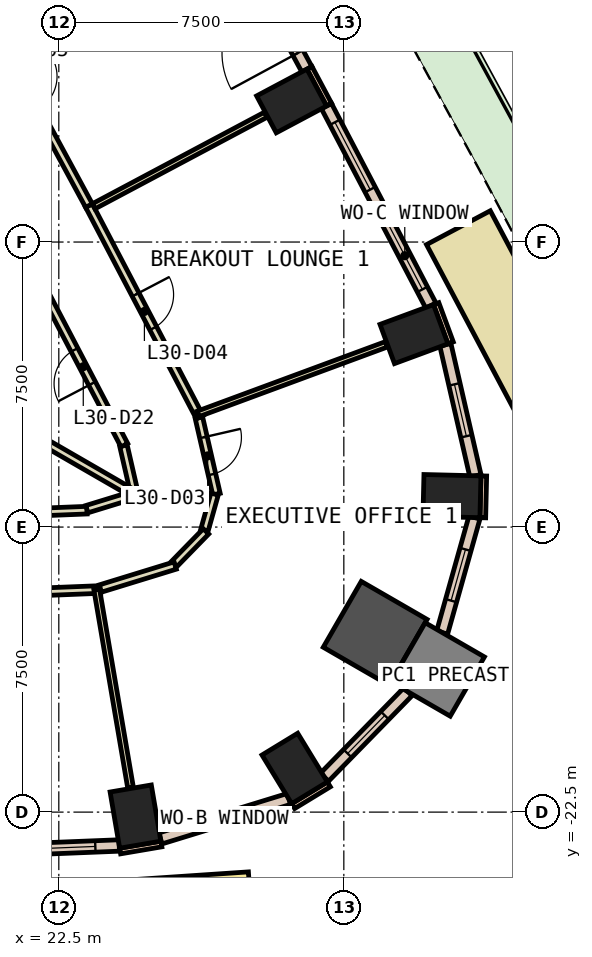
"""IFC4 building model, lengths in metres.
Left out: names, types, materials, properties, quantities, classifications, styles, units other than length and angle.
Written with IfcOpenShell. Run it as: python <this file> out.ifc"""

import sys

from ifc_helpers import new_model, si_unit, direction, frame, frame_2d, origin, origin_2d, place, context, subcontext, project, spatial, rectangle, extrude, element, fill, save


model = new_model("IFC4")
c1 = context("Model", 3, precision=1e-05, world=origin(), true_north=direction((0.0, 1.0)))
c2 = subcontext(c1, "Body", "Model", "MODEL_VIEW")
j1 = project(units=[si_unit("LENGTHUNIT", "METRE"), si_unit("PLANEANGLEUNIT", "RADIAN")], contexts=[c1])
p1 = place(None, origin())
s1 = spatial("IfcSite", under=j1, at=p1, CompositionType="ELEMENT")
p2 = place(p1, origin())
s2 = spatial("IfcBuilding", under=s1, at=p2, CompositionType="ELEMENT")
p3 = place(p2, frame((0.0, 0.0, 138.2)))
s3 = spatial("IfcBuildingStorey", under=s2, at=p3, CompositionType="ELEMENT", Elevation=138.2)
for number, where, z_axis, x_axis in (
    (1, (24.518, -22.618, 0.0), (0.0, 0.0, 1.0), (0.986, 0.168, 0.0)),
    (2, (28.707, -21.352, 0.0), (0.0, 0.0, 1.0), (0.854, 0.521, 0.0)),
):
    element("IfcColumn", number, at=place(p3, frame(where, z_axis=z_axis, x_axis=x_axis)), inside=s3, PredefinedType="COLUMN", context=c2, shape_type="SweptSolid", body=[
        extrude(rectangle(XDim=1.1, YDim=1.5, at=origin_2d()), origin(), (0.0, 0.0, 1.0), 3.8),
    ])
p4 = place(p3, frame((30.825, -17.796, 0.0), z_axis=(0.0, 0.0, 1.0), x_axis=(-0.866025403784, 0.5, 0.0)))
e3 = element("IfcColumn", 3, at=p4, inside=s3, PredefinedType="COLUMN", context=c2, shape_type="SweptSolid", body=[
    extrude(rectangle(XDim=2.0, YDim=2.0, at=origin_2d()), origin(), (0.0, 0.0, 1.0), 3.8),
])
for number, where, z_axis, x_axis in (
    (4, (32.845, -14.185, 0.0), (0.0, 0.0, 1.0), (0.024, 1.0, 0.0)),
    (5, (31.846, -9.923, 0.0), (0.0, 0.0, 1.0), (-0.347, 0.938, 0.0)),
    (6, (28.626, -3.788, 0.0), (0.0, 0.0, 1.0), (-0.47, 0.883, 0.0)),
):
    element("IfcColumn", number, at=place(p3, frame(where, z_axis=z_axis, x_axis=x_axis)), inside=s3, PredefinedType="COLUMN", context=c2, shape_type="SweptSolid", body=[
        extrude(rectangle(XDim=1.1, YDim=1.5, at=origin_2d()), origin(), (0.0, 0.0, 1.0), 3.8),
    ])
p5 = place(p3, frame((32.47, -18.746, 0.0), z_axis=(0.0, 0.0, 1.0), x_axis=(-0.866025403784, 0.5, 0.0)))
e7 = element("IfcColumn", 7, at=p5, inside=s3, PredefinedType="COLUMN", context=c2, shape_type="SweptSolid", body=[
    extrude(rectangle(XDim=1.8, YDim=1.8, at=origin_2d()), origin(), (0.0, 0.0, 1.0), 3.8),
])
for number, where, z_axis, x_axis in (
    (8, (32.81, -10.153, 0.0), (0.0, 0.0, 1.0), (-0.346, 0.938, 0.0)),
    (9, (29.612, -3.886, 0.0), (0.0, 0.0, 1.0), (-0.47, 0.883, 0.0)),
):
    element("IfcWall", number, at=place(p3, frame(where, z_axis=z_axis, x_axis=x_axis)), inside=s3, PredefinedType="STANDARD", context=c2, shape_type="SweptSolid", body=[
        extrude(rectangle(XDim=1.1, YDim=0.15, at=frame_2d((0.55, 0.0))), origin(), (0.0, 0.0, 1.0), 3.8),
    ])
p6 = place(p3, frame((24.114, -23.524, 0.0), z_axis=(0.0, 0.0, 1.0), x_axis=(0.985800082077, 0.167923191299, 0.0)))
e10 = element("IfcWall", 10, at=p6, inside=s3, PredefinedType="STANDARD", context=c2, shape_type="SweptSolid", body=[
    extrude(rectangle(XDim=1.101, YDim=0.15, at=frame_2d((0.55, 0.0))), origin(), (0.0, 0.0, 1.0), 3.8),
])
p7 = place(p3, frame((28.667, -22.342, 0.0), z_axis=(0.0, 0.0, 1.0), x_axis=(0.854005542721, 0.520263907071, 0.0)))
e11 = element("IfcWall", 11, at=p7, inside=s3, PredefinedType="STANDARD", context=c2, shape_type="SweptSolid", body=[
    extrude(rectangle(XDim=1.099, YDim=0.15, at=frame_2d((0.55, 0.0))), origin(), (0.0, 0.0, 1.0), 3.8),
])
p8 = place(p3, frame((33.657, -14.755, 0.0), z_axis=(0.0, 0.0, 1.0), x_axis=(0.023744690764, 0.999718055084, 0.0)))
e12 = element("IfcWall", 12, at=p8, inside=s3, PredefinedType="STANDARD", context=c2, shape_type="SweptSolid", body=[
    extrude(rectangle(XDim=1.1, YDim=0.15, at=frame_2d((0.55, 0.0))), origin(), (0.0, 0.0, 1.0), 3.8),
])
p9 = place(p3, frame((16.778, -23.67, 0.0), z_axis=(0.0, 0.0, 1.0), x_axis=(0.999203621229, 0.039901420066, 0.0)))
e13 = element("IfcWall", 13, at=p9, inside=s3, PredefinedType="STANDARD", context=c2, shape_type="SweptSolid", body=[
    extrude(rectangle(XDim=7.318, YDim=0.3, at=frame_2d((3.659, 0.0))), origin(), (0.0, 0.0, 1.0), 3.8),
])
p10 = place(p9, frame((0.629, 0.0, 0.9)))
e14 = element("IfcOpeningElement", 14, at=p10, cuts=e13, PredefinedType="OPENING", context=c2, shape_type="SweptSolid", body=[
    extrude(rectangle(XDim=2.4, YDim=2.6, at=frame_2d((1.2, 1.3))), frame((0.0, 0.16, 0.0), z_axis=(0.0, -1.0, 0.0), x_axis=(1.0, 0.0, 0.0)), (0.0, 0.0, 1.0), 0.32),
])
p11 = place(p9, frame((4.288, 0.0, 0.9)))
e15 = element("IfcOpeningElement", 15, at=p11, cuts=e13, PredefinedType="OPENING", context=c2, shape_type="SweptSolid", body=[
    extrude(rectangle(XDim=2.4, YDim=2.6, at=frame_2d((1.2, 1.3))), frame((0.0, 0.16, 0.0), z_axis=(0.0, -1.0, 0.0), x_axis=(1.0, 0.0, 0.0)), (0.0, 0.0, 1.0), 0.32),
])
p12 = place(p3, frame((25.173, -23.193, 0.0), z_axis=(0.0, 0.0, 1.0), x_axis=(0.955874475611, 0.293775402094, 0.0)))
e16 = element("IfcWall", 16, at=p12, inside=s3, PredefinedType="STANDARD", context=c2, shape_type="SweptSolid", body=[
    extrude(rectangle(XDim=3.537, YDim=0.3, at=frame_2d((1.769, 0.0))), origin(), (0.0, 0.0, 1.0), 3.8),
])
p13 = place(p12, frame((1.069, 0.0, 0.9)))
e17 = element("IfcOpeningElement", 17, at=p13, cuts=e16, PredefinedType="OPENING", context=c2, shape_type="SweptSolid", body=[
    extrude(rectangle(XDim=1.4, YDim=2.6, at=frame_2d((0.7, 1.3))), frame((0.0, 0.16, 0.0), z_axis=(0.0, -1.0, 0.0), x_axis=(1.0, 0.0, 0.0)), (0.0, 0.0, 1.0), 0.32),
])
p14 = place(p3, frame((29.491, -21.582, 0.0), z_axis=(0.0, 0.0, 1.0), x_axis=(0.698633260198, 0.715479956215, 0.0)))
e18 = element("IfcWall", 18, at=p14, inside=s3, PredefinedType="STANDARD", context=c2, shape_type="SweptSolid", body=[
    extrude(rectangle(XDim=3.145, YDim=0.3, at=frame_2d((1.572, 0.0))), origin(), (0.0, 0.0, 1.0), 3.8),
])
p15 = place(p14, frame((0.872, 0.0, 0.9)))
e19 = element("IfcOpeningElement", 19, at=p15, cuts=e18, PredefinedType="OPENING", context=c2, shape_type="SweptSolid", body=[
    extrude(rectangle(XDim=1.4, YDim=2.6, at=frame_2d((0.7, 1.3))), frame((0.0, 0.16, 0.0), z_axis=(0.0, -1.0, 0.0), x_axis=(1.0, 0.0, 0.0)), (0.0, 0.0, 1.0), 0.32),
])
p16 = place(p3, frame((32.587, -17.775, 0.0), z_axis=(0.0, 0.0, 1.0), x_axis=(0.270471130801, 0.962728085912, 0.0)))
e20 = element("IfcWall", 20, at=p16, inside=s3, PredefinedType="STANDARD", context=c2, shape_type="SweptSolid", body=[
    extrude(rectangle(XDim=3.143, YDim=0.3, at=frame_2d((1.572, 0.0))), origin(), (0.0, 0.0, 1.0), 3.8),
])
p17 = place(p16, frame((0.872, 0.0, 0.9)))
e21 = element("IfcOpeningElement", 21, at=p17, cuts=e20, PredefinedType="OPENING", context=c2, shape_type="SweptSolid", body=[
    extrude(rectangle(XDim=1.4, YDim=2.6, at=frame_2d((0.7, 1.3))), frame((0.0, 0.16, 0.0), z_axis=(0.0, -1.0, 0.0), x_axis=(1.0, 0.0, 0.0)), (0.0, 0.0, 1.0), 0.32),
])
p18 = place(p3, frame((33.463, -13.651, 0.0), z_axis=(0.0, 0.0, 1.0), x_axis=(-0.223538714932, 0.974695051247, 0.0)))
e22 = element("IfcWall", 22, at=p18, inside=s3, PredefinedType="STANDARD", context=c2, shape_type="SweptSolid", body=[
    extrude(rectangle(XDim=3.538, YDim=0.3, at=frame_2d((1.769, 0.0))), origin(), (0.0, 0.0, 1.0), 3.8),
])
p19 = place(p18, frame((1.069, 0.0, 0.9)))
e23 = element("IfcOpeningElement", 23, at=p19, cuts=e22, PredefinedType="OPENING", context=c2, shape_type="SweptSolid", body=[
    extrude(rectangle(XDim=1.4, YDim=2.6, at=frame_2d((0.7, 1.3))), frame((0.0, 0.16, 0.0), z_axis=(0.0, -1.0, 0.0), x_axis=(1.0, 0.0, 0.0)), (0.0, 0.0, 1.0), 0.32),
])
p20 = place(p3, frame((32.291, -9.173, 0.0), z_axis=(0.0, 0.0, 1.0), x_axis=(-0.463809970306, 0.885934710599, 0.0)))
e24 = element("IfcWall", 24, at=p20, inside=s3, PredefinedType="STANDARD", context=c2, shape_type="SweptSolid", body=[
    extrude(rectangle(XDim=5.927, YDim=0.3, at=frame_2d((2.963, 0.0))), origin(), (0.0, 0.0, 1.0), 3.8),
])
p21 = place(p20, frame((0.482, 0.0, 0.9)))
e25 = element("IfcOpeningElement", 25, at=p21, cuts=e24, PredefinedType="OPENING", context=c2, shape_type="SweptSolid", body=[
    extrude(rectangle(XDim=2.0, YDim=2.6, at=frame_2d((1.0, 1.3))), frame((0.0, 0.16, 0.0), z_axis=(0.0, -1.0, 0.0), x_axis=(1.0, 0.0, 0.0)), (0.0, 0.0, 1.0), 0.32),
])
p22 = place(p20, frame((3.445, 0.0, 0.9)))
e26 = element("IfcOpeningElement", 26, at=p22, cuts=e24, PredefinedType="OPENING", context=c2, shape_type="SweptSolid", body=[
    extrude(rectangle(XDim=2.0, YDim=2.6, at=frame_2d((1.0, 1.3))), frame((0.0, 0.16, 0.0), z_axis=(0.0, -1.0, 0.0), x_axis=(1.0, 0.0, 0.0)), (0.0, 0.0, 1.0), 0.32),
])
p23 = place(p3, frame((29.026, -2.953, 0.0), z_axis=(0.0, 0.0, 1.0), x_axis=(-0.475794135288, 0.87955667289, 0.0)))
e27 = element("IfcWall", 27, at=p23, inside=s3, PredefinedType="STANDARD", context=c2, shape_type="SweptSolid", body=[
    extrude(rectangle(XDim=5.952, YDim=0.3, at=frame_2d((2.976, 0.0))), origin(), (0.0, 0.0, 1.0), 3.8),
])
p24 = place(p23, frame((0.488, 0.0, 0.0)))
e28 = element("IfcOpeningElement", 28, at=p24, cuts=e27, PredefinedType="OPENING", context=c2, shape_type="SweptSolid", body=[
    extrude(rectangle(XDim=2.0, YDim=2.4, at=frame_2d((1.0, 1.2))), frame((0.0, 0.16, 0.0), z_axis=(0.0, -1.0, 0.0), x_axis=(1.0, 0.0, 0.0)), (0.0, 0.0, 1.0), 0.32),
])
p25 = place(p23, frame((3.464, 0.0, 0.9)))
e29 = element("IfcOpeningElement", 29, at=p25, cuts=e27, PredefinedType="OPENING", context=c2, shape_type="SweptSolid", body=[
    extrude(rectangle(XDim=2.0, YDim=2.6, at=frame_2d((1.0, 1.3))), frame((0.0, 0.16, 0.0), z_axis=(0.0, -1.0, 0.0), x_axis=(1.0, 0.0, 0.0)), (0.0, 0.0, 1.0), 0.32),
])
p26 = place(p3, frame((22.656, -25.351, 0.0), z_axis=(0.0, 0.0, 1.0), x_axis=(0.997736026517, 0.067251924811, 0.0)))
e30 = element("IfcWall", 30, at=p26, inside=s3, PredefinedType="STANDARD", context=c2, shape_type="SweptSolid", body=[
    extrude(rectangle(XDim=4.908, YDim=1.9, at=frame_2d((2.454, 0.0))), origin(), (0.0, 0.0, 1.0), 0.8),
])
p27 = place(p3, frame((35.46, -11.731, 0.0), z_axis=(0.0, 0.0, 1.0), x_axis=(-0.468724005249, 0.883344670501, 0.0)))
e31 = element("IfcWall", 31, at=p27, inside=s3, PredefinedType="STANDARD", context=c2, shape_type="SweptSolid", body=[
    extrude(rectangle(XDim=5.217, YDim=1.9, at=frame_2d((2.608, 0.0))), origin(), (0.0, 0.0, 1.0), 0.8),
])
p28 = place(p3, frame((18.585, -14.741, 0.0), z_axis=(0.0, 0.0, 1.0), x_axis=(0.99920304932, 0.039915739113, 0.0)))
e32 = element("IfcWall", 32, at=p28, inside=s3, PredefinedType="PARTITIONING", context=c2, shape_type="SweptSolid", body=[
    extrude(rectangle(XDim=4.661, YDim=0.2, at=frame_2d((2.33, 0.0))), origin(), (0.0, 0.0, 1.0), 3.8),
])
p29 = place(p28, frame((1.83, 0.0, 0.0)))
e33 = element("IfcOpeningElement", 33, at=p29, cuts=e32, PredefinedType="OPENING", context=c2, shape_type="SweptSolid", body=[
    extrude(rectangle(XDim=1.0, YDim=2.1, at=frame_2d((0.5, 1.05))), frame((0.0, 0.11, 0.0), z_axis=(0.0, -1.0, 0.0), x_axis=(1.0, 0.0, 0.0)), (0.0, 0.0, 1.0), 0.22),
])
p30 = place(p3, frame((23.238, -14.529, 0.0), z_axis=(0.0, 0.0, 1.0), x_axis=(0.956086269468, 0.293085389152, 0.0)))
e34 = element("IfcWall", 34, at=p30, inside=s3, PredefinedType="PARTITIONING", context=c2, shape_type="SweptSolid", body=[
    extrude(rectangle(XDim=1.252, YDim=0.2, at=frame_2d((0.626, 0.0))), origin(), (0.0, 0.0, 1.0), 3.8),
])
p31 = place(p3, frame((24.482, -14.081, 0.0), z_axis=(0.0, 0.0, 1.0), x_axis=(-0.223967203961, 0.974596681479, 0.0)))
e35 = element("IfcWall", 35, at=p31, inside=s3, PredefinedType="PARTITIONING", context=c2, shape_type="SweptSolid", body=[
    extrude(rectangle(XDim=1.259, YDim=0.2, at=frame_2d((0.629, 0.0))), origin(), (0.0, 0.0, 1.0), 3.8),
])
p32 = place(p3, frame((24.224, -12.845, 0.0), z_axis=(0.0, 0.0, 1.0), x_axis=(-0.463819025987, 0.885929969655, 0.0)))
e36 = element("IfcWall", 36, at=p32, inside=s3, PredefinedType="PARTITIONING", context=c2, shape_type="SweptSolid", body=[
    extrude(rectangle(XDim=4.659, YDim=0.2, at=frame_2d((2.33, 0.0))), origin(), (0.0, 0.0, 1.0), 3.8),
])
p33 = place(p32, frame((1.83, 0.0, 0.0)))
e37 = element("IfcOpeningElement", 37, at=p33, cuts=e36, PredefinedType="OPENING", context=c2, shape_type="SweptSolid", body=[
    extrude(rectangle(XDim=1.0, YDim=2.1, at=frame_2d((0.5, 1.05))), frame((0.0, 0.11, 0.0), z_axis=(0.0, -1.0, 0.0), x_axis=(1.0, 0.0, 0.0)), (0.0, 0.0, 1.0), 0.22),
])
p34 = place(p3, frame((23.598, -16.642, 0.0), z_axis=(0.0, 0.0, 1.0), x_axis=(-0.999203655486, -0.039900562205, 0.0)))
e38 = element("IfcWall", 38, at=p34, inside=s3, PredefinedType="PARTITIONING", context=c2, shape_type="SweptSolid", body=[
    extrude(rectangle(XDim=7.514, YDim=0.2, at=frame_2d((3.757, 0.0))), origin(), (0.0, 0.0, 1.0), 3.8),
])
p35 = place(p34, frame((3.332, 0.0, 0.0)))
e39 = element("IfcOpeningElement", 39, at=p35, cuts=e38, PredefinedType="OPENING", context=c2, shape_type="SweptSolid", body=[
    extrude(rectangle(XDim=1.0, YDim=2.1, at=frame_2d((0.5, 1.05))), frame((0.0, 0.11, 0.0), z_axis=(0.0, -1.0, 0.0), x_axis=(1.0, 0.0, 0.0)), (0.0, 0.0, 1.0), 0.22),
])
p36 = place(p3, frame((26.186, -12.12, 0.0), z_axis=(0.0, 0.0, 1.0), x_axis=(0.224108401048, -0.974564222912, 0.0)))
e40 = element("IfcWall", 40, at=p36, inside=s3, PredefinedType="PARTITIONING", context=c2, shape_type="SweptSolid", body=[
    extrude(rectangle(XDim=2.065, YDim=0.2, at=frame_2d((1.033, 0.0))), origin(), (0.0, 0.0, 1.0), 3.8),
])
p37 = place(p36, frame((0.533, 0.0, 0.0)))
e41 = element("IfcOpeningElement", 41, at=p37, cuts=e40, PredefinedType="OPENING", context=c2, shape_type="SweptSolid", body=[
    extrude(rectangle(XDim=1.0, YDim=2.1, at=frame_2d((0.5, 1.05))), frame((0.0, 0.11, 0.0), z_axis=(0.0, -1.0, 0.0), x_axis=(1.0, 0.0, 0.0)), (0.0, 0.0, 1.0), 0.22),
])
p38 = place(p3, frame((26.599, -14.132, 0.0), z_axis=(0.0, 0.0, 1.0), x_axis=(-0.270631784819, -0.962682936925, 0.0)))
e42 = element("IfcWall", 42, at=p38, inside=s3, PredefinedType="PARTITIONING", context=c2, shape_type="SweptSolid", body=[
    extrude(rectangle(XDim=0.994, YDim=0.2, at=frame_2d((0.497, 0.0))), origin(), (0.0, 0.0, 1.0), 3.8),
])
p39 = place(p3, frame((26.373, -15.114, 0.0), z_axis=(0.0, 0.0, 1.0), x_axis=(-0.698272822523, -0.715831729756, 0.0)))
e43 = element("IfcWall", 43, at=p39, inside=s3, PredefinedType="PARTITIONING", context=c2, shape_type="SweptSolid", body=[
    extrude(rectangle(XDim=1.196, YDim=0.2, at=frame_2d((0.598, 0.0))), origin(), (0.0, 0.0, 1.0), 3.8),
])
p40 = place(p3, frame((25.563, -16.012, 0.0), z_axis=(0.0, 0.0, 1.0), x_axis=(-0.955896815358, -0.293702704087, 0.0)))
e44 = element("IfcWall", 44, at=p40, inside=s3, PredefinedType="PARTITIONING", context=c2, shape_type="SweptSolid", body=[
    extrude(rectangle(XDim=2.06, YDim=0.2, at=frame_2d((1.03, 0.0))), origin(), (0.0, 0.0, 1.0), 3.8),
])
p41 = place(p3, frame((23.294, -6.541, 0.0), z_axis=(0.0, 0.0, 1.0), x_axis=(0.463802391881, -0.885938678062, 0.0)))
e45 = element("IfcWall", 45, at=p41, inside=s3, PredefinedType="PARTITIONING", context=c2, shape_type="SweptSolid", body=[
    extrude(rectangle(XDim=6.287, YDim=0.2, at=frame_2d((3.144, 0.0))), origin(), (0.0, 0.0, 1.0), 3.8),
])
p42 = place(p41, frame((2.644, 0.0, 0.0)))
e46 = element("IfcOpeningElement", 46, at=p42, cuts=e45, PredefinedType="OPENING", context=c2, shape_type="SweptSolid", body=[
    extrude(rectangle(XDim=1.0, YDim=2.1, at=frame_2d((0.5, 1.05))), frame((0.0, 0.11, 0.0), z_axis=(0.0, -1.0, 0.0), x_axis=(1.0, 0.0, 0.0)), (0.0, 0.0, 1.0), 0.22),
])
p43 = place(p3, frame((20.018, -0.489, 0.0), z_axis=(0.0, 0.0, 1.0), x_axis=(0.476025981828, -0.87943121654, 0.0)))
e47 = element("IfcWall", 47, at=p43, inside=s3, PredefinedType="PARTITIONING", context=c2, shape_type="SweptSolid", body=[
    extrude(rectangle(XDim=6.882, YDim=0.2, at=frame_2d((3.441, 0.0))), origin(), (0.0, 0.0, 1.0), 3.8),
])
p44 = place(p43, frame((3.016, 0.0, 0.0)))
e48 = element("IfcOpeningElement", 48, at=p44, cuts=e47, PredefinedType="OPENING", context=c2, shape_type="SweptSolid", body=[
    extrude(rectangle(XDim=1.0, YDim=2.1, at=frame_2d((0.5, 1.05))), frame((0.0, 0.11, 0.0), z_axis=(0.0, -1.0, 0.0), x_axis=(1.0, 0.0, 0.0)), (0.0, 0.0, 1.0), 0.22),
])
p45 = place(p3, frame((20.31, -11.721, 0.0), z_axis=(0.0, 0.0, 1.0), x_axis=(0.86603399059, -0.499985126921, 0.0)))
e49 = element("IfcWall", 49, at=p45, inside=s3, PredefinedType="PARTITIONING", context=c2, shape_type="SweptSolid", body=[
    extrude(rectangle(XDim=4.854, YDim=0.2, at=frame_2d((2.427, 0.0))), origin(), (0.0, 0.0, 1.0), 3.8),
])
p46 = place(p3, frame((23.498, -16.646, 0.0), z_axis=(0.0, 0.0, 1.0), x_axis=(0.168275674737, -0.985739974482, 0.0)))
e50 = element("IfcWall", 50, at=p46, inside=s3, PredefinedType="PARTITIONING", context=c2, shape_type="SweptSolid", body=[
    extrude(rectangle(XDim=5.288, YDim=0.15, at=frame_2d((2.644, 0.0))), origin(), (0.0, 0.0, 1.0), 3.8),
])
p47 = place(p3, frame((26.164, -12.023, 0.0), z_axis=(0.0, 0.0, 1.0), x_axis=(0.937995804261, 0.346646608505, 0.0)))
e51 = element("IfcWall", 51, at=p47, inside=s3, PredefinedType="PARTITIONING", context=c2, shape_type="SweptSolid", body=[
    extrude(rectangle(XDim=5.288, YDim=0.15, at=frame_2d((2.644, 0.0))), origin(), (0.0, 0.0, 1.0), 3.8),
])
p48 = place(p3, frame((23.417, -6.56, 0.0), z_axis=(0.0, 0.0, 1.0), x_axis=(0.882784638588, 0.469777906967, 0.0)))
e52 = element("IfcWall", 52, at=p48, inside=s3, PredefinedType="PARTITIONING", context=c2, shape_type="SweptSolid", body=[
    extrude(rectangle(XDim=5.13, YDim=0.15, at=frame_2d((2.565, 0.0))), origin(), (0.0, 0.0, 1.0), 3.8),
])
p49 = place(p11, origin())
e53 = element("IfcWindow", 53, at=p49, inside=s3, PartitioningType="SINGLE_PANEL", PredefinedType="WINDOW", context=c2, shape_type="SweptSolid", body=[
    extrude(rectangle(XDim=2.4, YDim=2.6, at=frame_2d((1.2, 1.3))), frame((0.0, 0.03, 0.0), z_axis=(0.0, -1.0, 0.0), x_axis=(1.0, 0.0, 0.0)), (0.0, 0.0, 1.0), 0.06),
])
fill(e15, e53)
p50 = place(p13, origin())
e54 = element("IfcWindow", 54, at=p50, inside=s3, PartitioningType="SINGLE_PANEL", PredefinedType="WINDOW", context=c2, shape_type="SweptSolid", body=[
    extrude(rectangle(XDim=1.4, YDim=2.6, at=frame_2d((0.7, 1.3))), frame((0.0, 0.03, 0.0), z_axis=(0.0, -1.0, 0.0), x_axis=(1.0, 0.0, 0.0)), (0.0, 0.0, 1.0), 0.06),
])
fill(e17, e54)
p51 = place(p15, origin())
e55 = element("IfcWindow", 55, at=p51, inside=s3, PartitioningType="SINGLE_PANEL", PredefinedType="WINDOW", context=c2, shape_type="SweptSolid", body=[
    extrude(rectangle(XDim=1.4, YDim=2.6, at=frame_2d((0.7, 1.3))), frame((0.0, 0.03, 0.0), z_axis=(0.0, -1.0, 0.0), x_axis=(1.0, 0.0, 0.0)), (0.0, 0.0, 1.0), 0.06),
])
fill(e19, e55)
p52 = place(p17, origin())
e56 = element("IfcWindow", 56, at=p52, inside=s3, PartitioningType="SINGLE_PANEL", PredefinedType="WINDOW", context=c2, shape_type="SweptSolid", body=[
    extrude(rectangle(XDim=1.4, YDim=2.6, at=frame_2d((0.7, 1.3))), frame((0.0, 0.03, 0.0), z_axis=(0.0, -1.0, 0.0), x_axis=(1.0, 0.0, 0.0)), (0.0, 0.0, 1.0), 0.06),
])
fill(e21, e56)
p53 = place(p19, origin())
e57 = element("IfcWindow", 57, at=p53, inside=s3, PartitioningType="SINGLE_PANEL", PredefinedType="WINDOW", context=c2, shape_type="SweptSolid", body=[
    extrude(rectangle(XDim=1.4, YDim=2.6, at=frame_2d((0.7, 1.3))), frame((0.0, 0.03, 0.0), z_axis=(0.0, -1.0, 0.0), x_axis=(1.0, 0.0, 0.0)), (0.0, 0.0, 1.0), 0.06),
])
fill(e23, e57)
p54 = place(p21, origin())
e58 = element("IfcWindow", 58, at=p54, inside=s3, PartitioningType="SINGLE_PANEL", PredefinedType="WINDOW", context=c2, shape_type="SweptSolid", body=[
    extrude(rectangle(XDim=2.0, YDim=2.6, at=frame_2d((1.0, 1.3))), frame((0.0, 0.03, 0.0), z_axis=(0.0, -1.0, 0.0), x_axis=(1.0, 0.0, 0.0)), (0.0, 0.0, 1.0), 0.06),
])
fill(e25, e58)
p55 = place(p22, origin())
e59 = element("IfcWindow", 59, at=p55, inside=s3, PartitioningType="SINGLE_PANEL", PredefinedType="WINDOW", context=c2, shape_type="SweptSolid", body=[
    extrude(rectangle(XDim=2.0, YDim=2.6, at=frame_2d((1.0, 1.3))), frame((0.0, 0.03, 0.0), z_axis=(0.0, -1.0, 0.0), x_axis=(1.0, 0.0, 0.0)), (0.0, 0.0, 1.0), 0.06),
])
fill(e26, e59)
p56 = place(p24, origin())
e60 = element("IfcDoor", 60, at=p56, inside=s3, OperationType="SLIDING_TO_LEFT", PredefinedType="DOOR", context=c2, shape_type="SweptSolid", body=[
    extrude(rectangle(XDim=2.0, YDim=2.4, at=frame_2d((1.0, 1.2))), frame((0.0, 0.025, 0.0), z_axis=(0.0, -1.0, 0.0), x_axis=(1.0, 0.0, 0.0)), (0.0, 0.0, 1.0), 0.05),
])
fill(e28, e60)
p57 = place(p37, origin())
e61 = element("IfcDoor", 61, at=p57, inside=s3, OperationType="SINGLE_SWING_LEFT", PredefinedType="DOOR", context=c2, shape_type="SweptSolid", body=[
    extrude(rectangle(XDim=1.0, YDim=2.1, at=frame_2d((0.5, 1.05))), frame((0.0, 0.025, 0.0), z_axis=(0.0, -1.0, 0.0), x_axis=(1.0, 0.0, 0.0)), (0.0, 0.0, 1.0), 0.05),
])
fill(e41, e61)
p58 = place(p42, origin())
e62 = element("IfcDoor", 62, at=p58, inside=s3, OperationType="SINGLE_SWING_LEFT", PredefinedType="DOOR", context=c2, shape_type="SweptSolid", body=[
    extrude(rectangle(XDim=1.0, YDim=2.1, at=frame_2d((0.5, 1.05))), frame((0.0, 0.025, 0.0), z_axis=(0.0, -1.0, 0.0), x_axis=(1.0, 0.0, 0.0)), (0.0, 0.0, 1.0), 0.05),
])
fill(e46, e62)
p59 = place(p33, origin())
e63 = element("IfcDoor", 63, at=p59, inside=s3, OperationType="SINGLE_SWING_LEFT", PredefinedType="DOOR", context=c2, shape_type="SweptSolid", body=[
    extrude(rectangle(XDim=1.0, YDim=2.1, at=frame_2d((0.5, 1.05))), frame((0.0, 0.025, 0.0), z_axis=(0.0, -1.0, 0.0), x_axis=(1.0, 0.0, 0.0)), (0.0, 0.0, 1.0), 0.05),
])
fill(e37, e63)
save(model, sys.argv[1])
